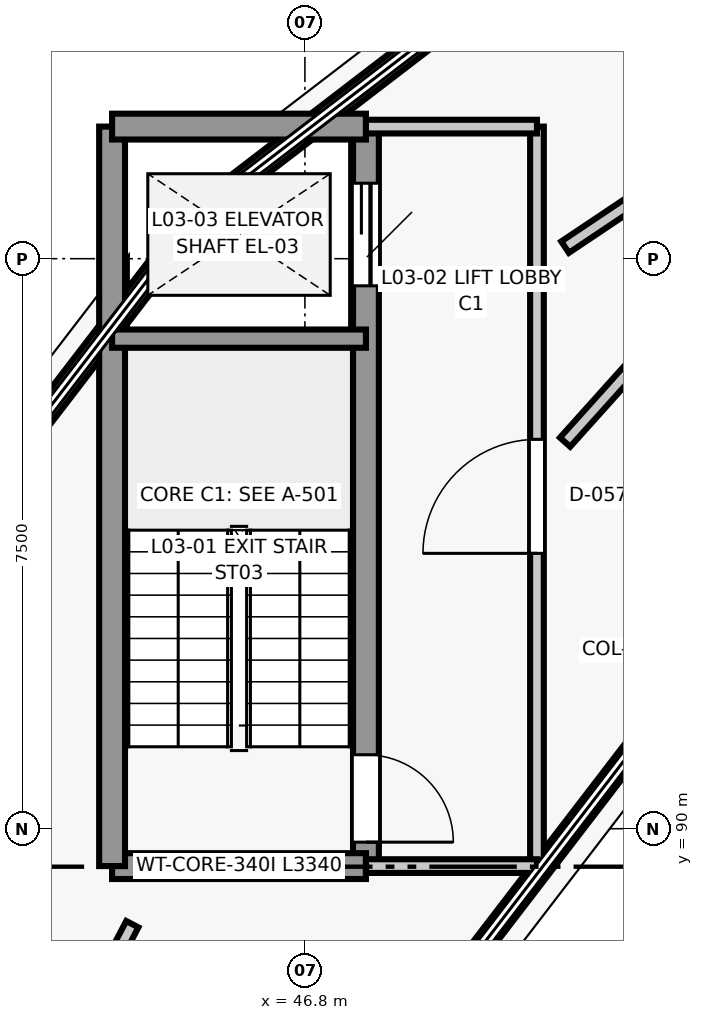
"""IFC4 building model, lengths in metres.
Left out: names, types, materials, properties, quantities, classifications, styles, units other than length and angle.
Written with IfcOpenShell. Run it as: python <this file> out.ifc"""

import sys

from ifc_helpers import new_model, si_unit, direction, frame, frame_2d, origin, place, context, subcontext, project, spatial, rectangle, extrude, element, fill, save


model = new_model("IFC4")
c1 = context("Model", 3, precision=1e-05, world=origin(), true_north=direction((0.0, 1.0)))
c2 = subcontext(c1, "Body", "Model", "MODEL_VIEW")
j1 = project(units=[si_unit("LENGTHUNIT", "METRE"), si_unit("PLANEANGLEUNIT", "RADIAN")], contexts=[c1])
p1 = place(None, origin())
s1 = spatial("IfcSite", under=j1, at=p1, CompositionType="ELEMENT")
p2 = place(p1, origin())
s2 = spatial("IfcBuilding", under=s1, at=p2, CompositionType="ELEMENT")
p3 = place(p2, frame((0.0, 0.0, 12.6)))
s3 = spatial("IfcBuildingStorey", under=s2, at=p3, CompositionType="ELEMENT", Elevation=12.6)
p4 = place(p3, frame((45.402, 98.098, 0.0), z_axis=(0.0, 0.0, 1.0), x_axis=(0.793347191248, 0.608769442514, 0.0)))
e1 = element("IfcWall", 1, at=p4, inside=s3, PredefinedType="STANDARD", context=c2, shape_type="SweptSolid", body=[
    extrude(rectangle(XDim=11.587, YDim=0.28, at=frame_2d((5.793, 0.0))), origin(), (0.0, 0.0, 1.0), 0.82),
])
p5 = place(p3, frame((38.436, 89.019, 0.0), z_axis=(0.0, 0.0, 1.0), x_axis=(0.608753523874, 0.793359406052, 0.0)))
e2 = element("IfcWall", 2, at=p5, inside=s3, PredefinedType="STANDARD", context=c2, shape_type="SweptSolid", body=[
    extrude(rectangle(XDim=11.444, YDim=0.28, at=frame_2d((5.722, 0.0))), origin(), (0.0, 0.0, 1.0), 0.82),
])
p6 = place(p3, frame((51.481, 91.524, 0.0), z_axis=(0.0, 0.0, 1.0), x_axis=(-0.608769580289, -0.793347085527, 0.0)))
e3 = element("IfcWall", 3, at=p6, inside=s3, PredefinedType="STANDARD", context=c2, shape_type="SweptSolid", body=[
    extrude(rectangle(XDim=9.005, YDim=0.25, at=frame_2d((4.502, 0.0))), origin(), (0.0, 0.0, 1.0), 0.82),
])
p7 = place(p3, frame((47.603, 99.238, 0.0), z_axis=(0.0, 0.0, 1.0), x_axis=(0.0, -1.0, 0.0)))
e4 = element("IfcWall", 4, at=p7, inside=s3, PredefinedType="SHEAR", context=c2, shape_type="SweptSolid", body=[
    extrude(rectangle(XDim=9.73, YDim=0.34, at=frame_2d((4.865, 0.0))), origin(), (0.0, 0.0, 1.0), 3.9),
])
p8 = place(p7, frame((8.265, 0.0, 0.0)))
e5 = element("IfcOpeningElement", 5, at=p8, cuts=e4, PredefinedType="OPENING", context=c2, shape_type="SweptSolid", body=[
    extrude(rectangle(XDim=1.15, YDim=2.15, at=frame_2d((0.575, 1.075))), frame((0.0, 0.18, 0.0), z_axis=(0.0, -1.0, 0.0), x_axis=(1.0, 0.0, 0.0)), (0.0, 0.0, 1.0), 0.36),
])
p9 = place(p7, frame((0.745, 0.0, 0.0)))
e6 = element("IfcOpeningElement", 6, at=p9, cuts=e4, PredefinedType="OPENING", context=c2, shape_type="SweptSolid", body=[
    extrude(rectangle(XDim=1.35, YDim=2.15, at=frame_2d((0.675, 1.075))), frame((0.0, 0.18, 0.0), z_axis=(0.0, -1.0, 0.0), x_axis=(1.0, 0.0, 0.0)), (0.0, 0.0, 1.0), 0.36),
])
p10 = place(p3, frame((47.603, 89.508, 0.0), z_axis=(0.0, 0.0, 1.0), x_axis=(-1.0, 0.0, 0.0)))
e7 = element("IfcWall", 7, at=p10, inside=s3, PredefinedType="SHEAR", context=c2, shape_type="SweptSolid", body=[
    extrude(rectangle(XDim=3.34, YDim=0.34, at=frame_2d((1.67, 0.0))), origin(), (0.0, 0.0, 1.0), 3.9),
])
p11 = place(p3, frame((44.263, 89.508, 0.0), z_axis=(0.0, 0.0, 1.0), x_axis=(0.0, 1.0, 0.0)))
e8 = element("IfcWall", 8, at=p11, inside=s3, PredefinedType="SHEAR", context=c2, shape_type="SweptSolid", body=[
    extrude(rectangle(XDim=9.73, YDim=0.34, at=frame_2d((4.865, 0.0))), origin(), (0.0, 0.0, 1.0), 3.9),
])
p12 = place(p3, frame((44.263, 99.238, 0.0), z_axis=(0.0, 0.0, 1.0), x_axis=(1.0, 0.0, 0.0)))
e9 = element("IfcWall", 9, at=p12, inside=s3, PredefinedType="SHEAR", context=c2, shape_type="SweptSolid", body=[
    extrude(rectangle(XDim=3.34, YDim=0.34, at=frame_2d((1.67, 0.0))), origin(), (0.0, 0.0, 1.0), 3.9),
])
p13 = place(p3, frame((47.603, 96.448, 0.0), z_axis=(0.0, 0.0, 1.0), x_axis=(-1.0, 0.0, 0.0)))
e10 = element("IfcWall", 10, at=p13, inside=s3, PredefinedType="SHEAR", context=c2, shape_type="SweptSolid", body=[
    extrude(rectangle(XDim=3.34, YDim=0.24, at=frame_2d((1.67, 0.0))), origin(), (0.0, 0.0, 1.0), 3.9),
])
p14 = place(p3, frame((49.853, 89.508, 0.0), z_axis=(0.0, 0.0, 1.0), x_axis=(0.0, 1.0, 0.0)))
e11 = element("IfcWall", 11, at=p14, inside=s3, PredefinedType="PARTITIONING", context=c2, shape_type="SweptSolid", body=[
    extrude(rectangle(XDim=9.73, YDim=0.18, at=frame_2d((4.865, 0.0))), origin(), (0.0, 0.0, 1.0), 3.595),
])
p15 = place(p14, frame((4.115, 0.0, 0.0)))
e12 = element("IfcOpeningElement", 12, at=p15, cuts=e11, PredefinedType="OPENING", context=c2, shape_type="SweptSolid", body=[
    extrude(rectangle(XDim=1.5, YDim=2.15, at=frame_2d((0.75, 1.075))), frame((0.0, 0.1, 0.0), z_axis=(0.0, -1.0, 0.0), x_axis=(1.0, 0.0, 0.0)), (0.0, 0.0, 1.0), 0.2),
])
for number, where, z_axis, x_axis in (
    (13, (47.603, 89.508, 0.0), (0.0, 0.0, 1.0), (1.0, 0.0, 0.0)),
    (14, (47.603, 99.238, 0.0), (0.0, 0.0, 1.0), (1.0, 0.0, 0.0)),
):
    element("IfcWall", number, at=place(p3, frame(where, z_axis=z_axis, x_axis=x_axis)), inside=s3, PredefinedType="PARTITIONING", context=c2, shape_type="SweptSolid", body=[
        extrude(rectangle(XDim=2.25, YDim=0.18, at=frame_2d((1.125, 0.0))), origin(), (0.0, 0.0, 1.0), 3.595),
    ])
p16 = place(p3, frame((58.926, 103.479, 0.0), z_axis=(0.0, 0.0, 1.0), x_axis=(-0.83093334765, -0.556371972482, 0.0)))
e15 = element("IfcWall", 15, at=p16, inside=s3, PredefinedType="PARTITIONING", context=c2, shape_type="SweptSolid", body=[
    extrude(rectangle(XDim=10.474, YDim=0.18, at=frame_2d((5.237, 0.0))), origin(), (0.0, 0.0, 1.0), 3.595),
])
p17 = place(p16, frame((4.712, 0.0, 0.0)))
e16 = element("IfcOpeningElement", 16, at=p17, cuts=e15, PredefinedType="OPENING", context=c2, shape_type="SweptSolid", body=[
    extrude(rectangle(XDim=1.05, YDim=2.1, at=frame_2d((0.525, 1.05))), frame((0.0, 0.1, 0.0), z_axis=(0.0, -1.0, 0.0), x_axis=(1.0, 0.0, 0.0)), (0.0, 0.0, 1.0), 0.2),
])
p18 = place(p3, frame((51.295, 96.28, 0.0), z_axis=(0.0, 0.0, 1.0), x_axis=(-0.668065235736, -0.744102708503, 0.0)))
e17 = element("IfcWall", 17, at=p18, inside=s3, PredefinedType="PARTITIONING", context=c2, shape_type="SweptSolid", body=[
    extrude(rectangle(XDim=1.605, YDim=0.18, at=frame_2d((0.803, 0.0))), origin(), (0.0, 0.0, 1.0), 3.595),
])
p19 = place(p3, frame((44.529, 88.744, 0.0), z_axis=(0.0, 0.0, 1.0), x_axis=(-0.463911518327, -0.885881540141, 0.0)))
e18 = element("IfcWall", 18, at=p19, inside=s3, PredefinedType="PARTITIONING", context=c2, shape_type="SweptSolid", body=[
    extrude(rectangle(XDim=10.128, YDim=0.18, at=frame_2d((5.064, 0.0))), origin(), (0.0, 0.0, 1.0), 3.595),
])
p20 = place(p19, frame((4.539, 0.0, 0.0)))
e19 = element("IfcOpeningElement", 19, at=p20, cuts=e18, PredefinedType="OPENING", context=c2, shape_type="SweptSolid", body=[
    extrude(rectangle(XDim=1.05, YDim=2.1, at=frame_2d((0.525, 1.05))), frame((0.0, 0.1, 0.0), z_axis=(0.0, -1.0, 0.0), x_axis=(1.0, 0.0, 0.0)), (0.0, 0.0, 1.0), 0.2),
])
p21 = place(p8, origin())
e20 = element("IfcDoor", 20, at=p21, inside=s3, OperationType="SINGLE_SWING_RIGHT", PredefinedType="DOOR", context=c2, shape_type="SweptSolid", body=[
    extrude(rectangle(XDim=1.15, YDim=2.15, at=frame_2d((0.575, 1.075))), frame((0.0, 0.025, 0.0), z_axis=(0.0, -1.0, 0.0), x_axis=(1.0, 0.0, 0.0)), (0.0, 0.0, 1.0), 0.05),
])
fill(e5, e20)
p22 = place(p9, origin())
e21 = element("IfcDoor", 21, at=p22, inside=s3, OperationType="SLIDING_TO_LEFT", PredefinedType="DOOR", context=c2, shape_type="SweptSolid", body=[
    extrude(rectangle(XDim=1.35, YDim=2.15, at=frame_2d((0.675, 1.075))), frame((0.0, 0.025, 0.0), z_axis=(0.0, -1.0, 0.0), x_axis=(1.0, 0.0, 0.0)), (0.0, 0.0, 1.0), 0.05),
])
fill(e6, e21)
p23 = place(p15, origin())
e22 = element("IfcDoor", 22, at=p23, inside=s3, OperationType="SINGLE_SWING_LEFT", PredefinedType="DOOR", context=c2, shape_type="SweptSolid", body=[
    extrude(rectangle(XDim=1.5, YDim=2.15, at=frame_2d((0.75, 1.075))), frame((0.0, 0.025, 0.0), z_axis=(0.0, -1.0, 0.0), x_axis=(1.0, 0.0, 0.0)), (0.0, 0.0, 1.0), 0.05),
])
fill(e12, e22)
save(model, sys.argv[1])
